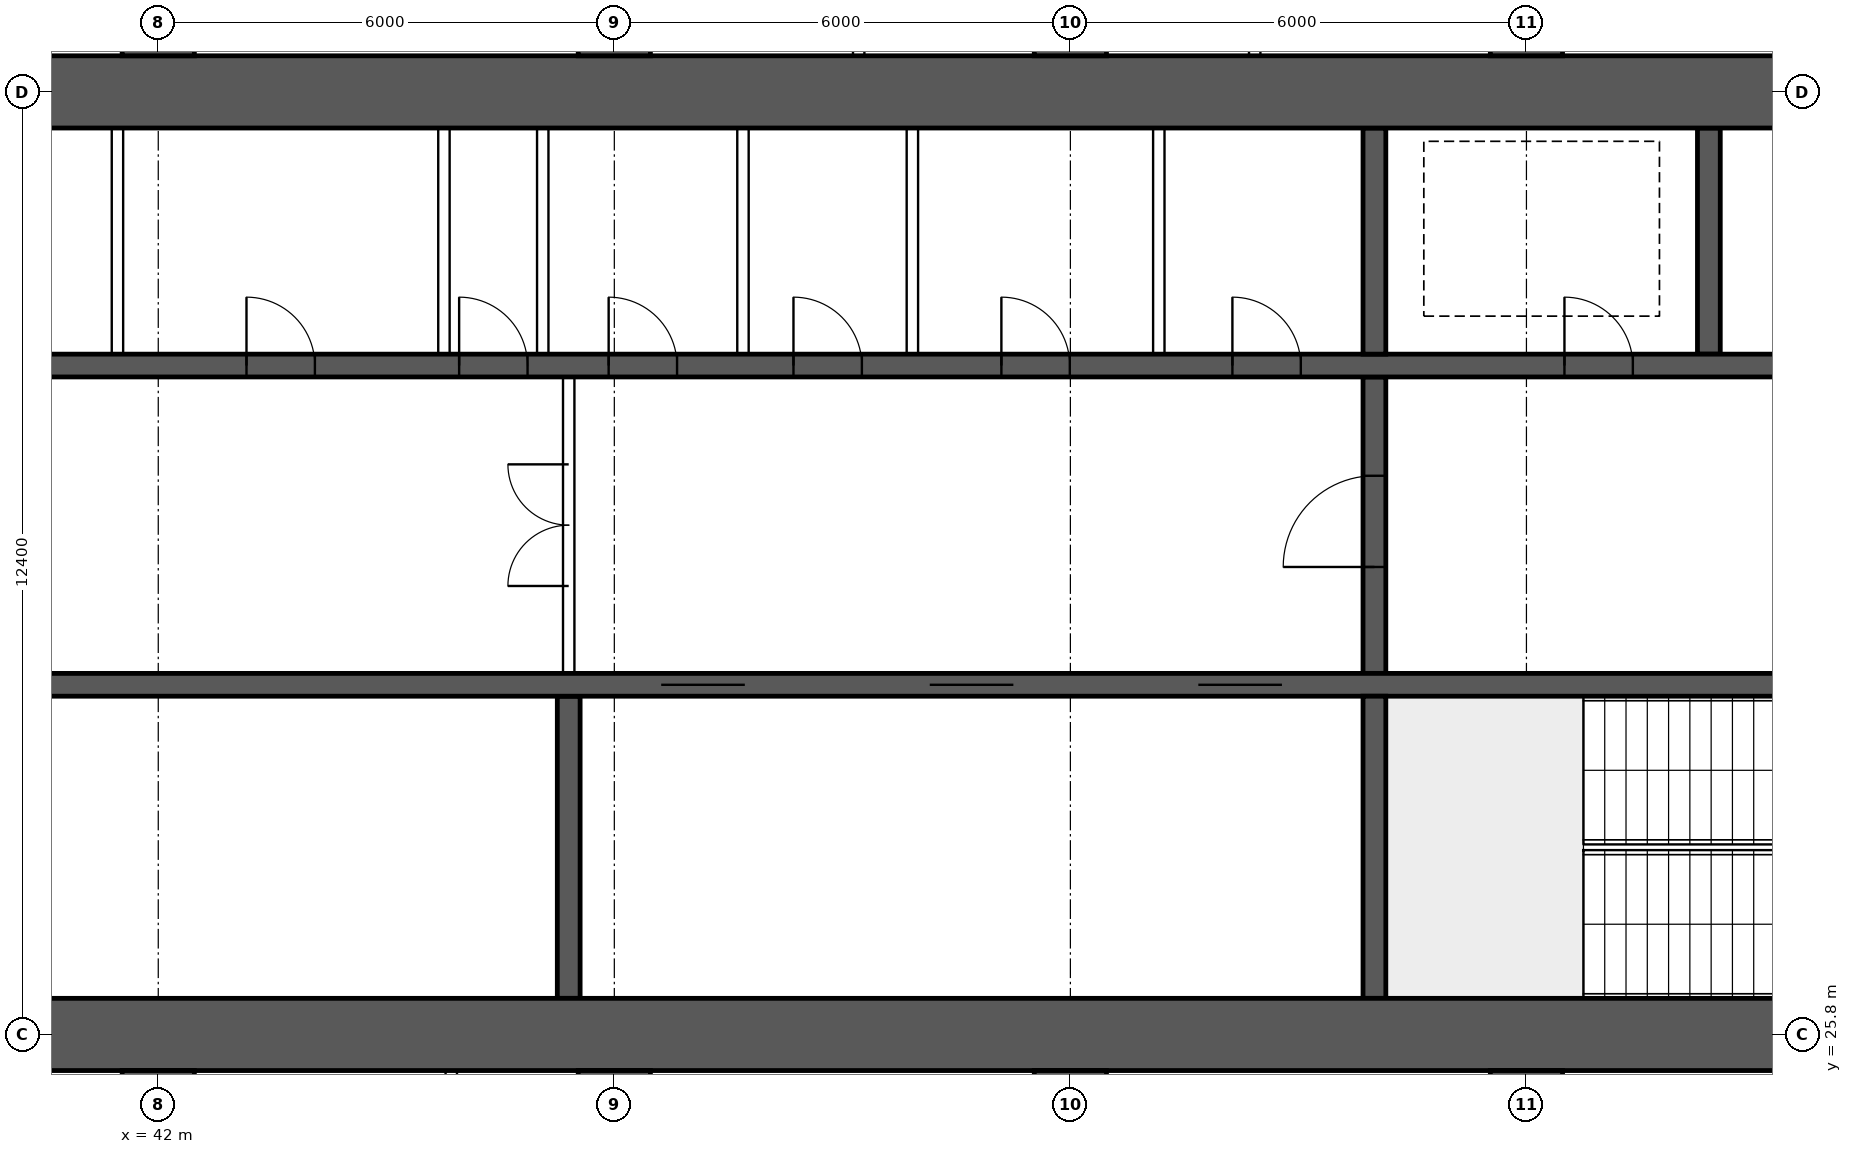
"""IFC4 building model, lengths in metres.
Left out: names, types, materials, properties, quantities, classifications, styles, units other than length and angle.
Written with IfcOpenShell. Run it as: python <this file> out.ifc"""

import sys

from ifc_helpers import new_model, si_unit, direction, frame, frame_2d, origin, place, context, subcontext, project, spatial, rectangle, extrude, element, fill, save


model = new_model("IFC4")
c1 = context("Model", 3, precision=1e-05, world=origin(), true_north=direction((0.0, 1.0)))
c2 = subcontext(c1, "Body", "Model", "MODEL_VIEW")
j1 = project(units=[si_unit("LENGTHUNIT", "METRE"), si_unit("PLANEANGLEUNIT", "RADIAN")], contexts=[c1])
p1 = place(None, origin())
s1 = spatial("IfcSite", under=j1, at=p1, CompositionType="ELEMENT")
p2 = place(p1, origin())
s2 = spatial("IfcBuilding", under=s1, at=p2, CompositionType="ELEMENT")
p3 = place(p2, frame((0.0, 0.0, 125.65)))
s3 = spatial("IfcBuildingStorey", under=s2, at=p3, CompositionType="ELEMENT", Elevation=125.65)
for number, where, z_axis, x_axis in (
    (1, (18.0, 25.8, 0.0), (0.0, 0.0, 1.0), (1.0, 0.0, 0.0)),
    (2, (18.0, 38.2, 0.0), (0.0, 0.0, 1.0), (1.0, 0.0, 0.0)),
):
    element("IfcWall", number, at=place(p3, frame(where, z_axis=z_axis, x_axis=x_axis)), inside=s3, PredefinedType="SHEAR", context=c2, shape_type="SweptSolid", body=[
        extrude(rectangle(XDim=48.0, YDim=0.95, at=frame_2d((24.0, 0.0))), origin(), (0.0, 0.0, 1.0), 3.75),
    ])
p4 = place(p3, frame((18.475, 30.4, 0.0), z_axis=(0.0, 0.0, 1.0), x_axis=(1.0, 0.0, 0.0)))
e3 = element("IfcWall", 3, at=p4, inside=s3, PredefinedType="SHEAR", context=c2, shape_type="SweptSolid", body=[
    extrude(rectangle(XDim=47.05, YDim=0.3, at=frame_2d((23.525, 0.0))), origin(), (0.0, 0.0, 1.0), 3.75),
])
p5 = place(p4, frame((0.4, 0.0, 0.0)))
e4 = element("IfcOpeningElement", 4, at=p5, cuts=e3, PredefinedType="OPENING", context=c2, shape_type="SweptSolid", body=[
    extrude(rectangle(XDim=1.0, YDim=2.1, at=frame_2d((0.5, 1.05))), frame((0.0, 0.16, 0.0), z_axis=(0.0, -1.0, 0.0), x_axis=(1.0, 0.0, 0.0)), (0.0, 0.0, 1.0), 0.32),
])
p6 = place(p4, frame((45.65, 0.0, 0.0)))
e5 = element("IfcOpeningElement", 5, at=p6, cuts=e3, PredefinedType="OPENING", context=c2, shape_type="SweptSolid", body=[
    extrude(rectangle(XDim=1.0, YDim=2.1, at=frame_2d((0.5, 1.05))), frame((0.0, 0.16, 0.0), z_axis=(0.0, -1.0, 0.0), x_axis=(1.0, 0.0, 0.0)), (0.0, 0.0, 1.0), 0.32),
])
p7 = place(p4, frame((8.275, 0.0, 0.0)))
e6 = element("IfcOpeningElement", 6, at=p7, cuts=e3, PredefinedType="OPENING", context=c2, shape_type="SweptSolid", body=[
    extrude(rectangle(XDim=1.1, YDim=2.1, at=frame_2d((0.55, 1.05))), frame((0.0, 0.16, 0.0), z_axis=(0.0, -1.0, 0.0), x_axis=(1.0, 0.0, 0.0)), (0.0, 0.0, 1.0), 0.32),
])
p8 = place(p4, frame((10.875, 0.0, 0.0)))
e7 = element("IfcOpeningElement", 7, at=p8, cuts=e3, PredefinedType="OPENING", context=c2, shape_type="SweptSolid", body=[
    extrude(rectangle(XDim=1.1, YDim=2.1, at=frame_2d((0.55, 1.05))), frame((0.0, 0.16, 0.0), z_axis=(0.0, -1.0, 0.0), x_axis=(1.0, 0.0, 0.0)), (0.0, 0.0, 1.0), 0.32),
])
p9 = place(p4, frame((13.475, 0.0, 0.0)))
e8 = element("IfcOpeningElement", 8, at=p9, cuts=e3, PredefinedType="OPENING", context=c2, shape_type="SweptSolid", body=[
    extrude(rectangle(XDim=1.1, YDim=2.1, at=frame_2d((0.55, 1.05))), frame((0.0, 0.16, 0.0), z_axis=(0.0, -1.0, 0.0), x_axis=(1.0, 0.0, 0.0)), (0.0, 0.0, 1.0), 0.32),
])
p10 = place(p4, frame((16.075, 0.0, 0.0)))
e9 = element("IfcOpeningElement", 9, at=p10, cuts=e3, PredefinedType="OPENING", context=c2, shape_type="SweptSolid", body=[
    extrude(rectangle(XDim=1.1, YDim=2.1, at=frame_2d((0.55, 1.05))), frame((0.0, 0.16, 0.0), z_axis=(0.0, -1.0, 0.0), x_axis=(1.0, 0.0, 0.0)), (0.0, 0.0, 1.0), 0.32),
])
p11 = place(p4, frame((18.85, 0.0, 0.0)))
e10 = element("IfcOpeningElement", 10, at=p11, cuts=e3, PredefinedType="OPENING", context=c2, shape_type="SweptSolid", body=[
    extrude(rectangle(XDim=0.9, YDim=2.1, at=frame_2d((0.45, 1.05))), frame((0.0, 0.16, 0.0), z_axis=(0.0, -1.0, 0.0), x_axis=(1.0, 0.0, 0.0)), (0.0, 0.0, 1.0), 0.32),
])
p12 = place(p4, frame((30.142, 0.0, 0.0)))
e11 = element("IfcOpeningElement", 11, at=p12, cuts=e3, PredefinedType="OPENING", context=c2, shape_type="SweptSolid", body=[
    extrude(rectangle(XDim=1.1, YDim=2.1, at=frame_2d((0.55, 1.05))), frame((0.0, 0.16, 0.0), z_axis=(0.0, -1.0, 0.0), x_axis=(1.0, 0.0, 0.0)), (0.0, 0.0, 1.0), 0.32),
])
p13 = place(p4, frame((33.675, 0.0, 0.0)))
e12 = element("IfcOpeningElement", 12, at=p13, cuts=e3, PredefinedType="OPENING", context=c2, shape_type="SweptSolid", body=[
    extrude(rectangle(XDim=1.1, YDim=2.1, at=frame_2d((0.55, 1.05))), frame((0.0, 0.16, 0.0), z_axis=(0.0, -1.0, 0.0), x_axis=(1.0, 0.0, 0.0)), (0.0, 0.0, 1.0), 0.32),
])
p14 = place(p4, frame((37.208, 0.0, 0.0)))
e13 = element("IfcOpeningElement", 13, at=p14, cuts=e3, PredefinedType="OPENING", context=c2, shape_type="SweptSolid", body=[
    extrude(rectangle(XDim=1.1, YDim=2.1, at=frame_2d((0.55, 1.05))), frame((0.0, 0.16, 0.0), z_axis=(0.0, -1.0, 0.0), x_axis=(1.0, 0.0, 0.0)), (0.0, 0.0, 1.0), 0.32),
])
p15 = place(p3, frame((18.475, 34.6, 0.0), z_axis=(0.0, 0.0, 1.0), x_axis=(1.0, 0.0, 0.0)))
e14 = element("IfcWall", 14, at=p15, inside=s3, PredefinedType="SHEAR", context=c2, shape_type="SweptSolid", body=[
    extrude(rectangle(XDim=47.05, YDim=0.3, at=frame_2d((23.525, 0.0))), origin(), (0.0, 0.0, 1.0), 3.75),
])
p16 = place(p15, frame((0.9, 0.0, 0.0)))
e15 = element("IfcOpeningElement", 15, at=p16, cuts=e14, PredefinedType="OPENING", context=c2, shape_type="SweptSolid", body=[
    extrude(rectangle(XDim=1.1, YDim=2.1, at=frame_2d((0.55, 1.05))), frame((0.0, 0.16, 0.0), z_axis=(0.0, -1.0, 0.0), x_axis=(1.0, 0.0, 0.0)), (0.0, 0.0, 1.0), 0.32),
])
p17 = place(p15, frame((45.05, 0.0, 0.0)))
e16 = element("IfcOpeningElement", 16, at=p17, cuts=e14, PredefinedType="OPENING", context=c2, shape_type="SweptSolid", body=[
    extrude(rectangle(XDim=1.1, YDim=2.1, at=frame_2d((0.55, 1.05))), frame((0.0, 0.16, 0.0), z_axis=(0.0, -1.0, 0.0), x_axis=(1.0, 0.0, 0.0)), (0.0, 0.0, 1.0), 0.32),
])
p18 = place(p15, frame((4.125, 0.0, 0.0)))
e17 = element("IfcOpeningElement", 17, at=p18, cuts=e14, PredefinedType="OPENING", context=c2, shape_type="SweptSolid", body=[
    extrude(rectangle(XDim=0.9, YDim=2.1, at=frame_2d((0.45, 1.05))), frame((0.0, 0.16, 0.0), z_axis=(0.0, -1.0, 0.0), x_axis=(1.0, 0.0, 0.0)), (0.0, 0.0, 1.0), 0.32),
])
p19 = place(p15, frame((42.025, 0.0, 0.0)))
e18 = element("IfcOpeningElement", 18, at=p19, cuts=e14, PredefinedType="OPENING", context=c2, shape_type="SweptSolid", body=[
    extrude(rectangle(XDim=0.9, YDim=2.1, at=frame_2d((0.45, 1.05))), frame((0.0, 0.16, 0.0), z_axis=(0.0, -1.0, 0.0), x_axis=(1.0, 0.0, 0.0)), (0.0, 0.0, 1.0), 0.32),
])
p20 = place(p15, frame((8.9, 0.0, 0.0)))
e19 = element("IfcOpeningElement", 19, at=p20, cuts=e14, PredefinedType="OPENING", context=c2, shape_type="SweptSolid", body=[
    extrude(rectangle(XDim=0.9, YDim=2.1, at=frame_2d((0.45, 1.05))), frame((0.0, 0.16, 0.0), z_axis=(0.0, -1.0, 0.0), x_axis=(1.0, 0.0, 0.0)), (0.0, 0.0, 1.0), 0.32),
])
p21 = place(p15, frame((12.874, 0.0, 0.0)))
e20 = element("IfcOpeningElement", 20, at=p21, cuts=e14, PredefinedType="OPENING", context=c2, shape_type="SweptSolid", body=[
    extrude(rectangle(XDim=0.9, YDim=2.1, at=frame_2d((0.45, 1.05))), frame((0.0, 0.16, 0.0), z_axis=(0.0, -1.0, 0.0), x_axis=(1.0, 0.0, 0.0)), (0.0, 0.0, 1.0), 0.32),
])
p22 = place(p15, frame((16.521, 0.0, 0.0)))
e21 = element("IfcOpeningElement", 21, at=p22, cuts=e14, PredefinedType="OPENING", context=c2, shape_type="SweptSolid", body=[
    extrude(rectangle(XDim=0.9, YDim=2.1, at=frame_2d((0.45, 1.05))), frame((0.0, 0.16, 0.0), z_axis=(0.0, -1.0, 0.0), x_axis=(1.0, 0.0, 0.0)), (0.0, 0.0, 1.0), 0.32),
])
p23 = place(p15, frame((20.28, 0.0, 0.0)))
e22 = element("IfcOpeningElement", 22, at=p23, cuts=e14, PredefinedType="OPENING", context=c2, shape_type="SweptSolid", body=[
    extrude(rectangle(XDim=0.9, YDim=2.1, at=frame_2d((0.45, 1.05))), frame((0.0, 0.16, 0.0), z_axis=(0.0, -1.0, 0.0), x_axis=(1.0, 0.0, 0.0)), (0.0, 0.0, 1.0), 0.32),
])
p24 = place(p15, frame((24.686, 0.0, 0.0)))
e23 = element("IfcOpeningElement", 23, at=p24, cuts=e14, PredefinedType="OPENING", context=c2, shape_type="SweptSolid", body=[
    extrude(rectangle(XDim=0.9, YDim=2.1, at=frame_2d((0.45, 1.05))), frame((0.0, 0.16, 0.0), z_axis=(0.0, -1.0, 0.0), x_axis=(1.0, 0.0, 0.0)), (0.0, 0.0, 1.0), 0.32),
])
p25 = place(p15, frame((27.483, 0.0, 0.0)))
e24 = element("IfcOpeningElement", 24, at=p25, cuts=e14, PredefinedType="OPENING", context=c2, shape_type="SweptSolid", body=[
    extrude(rectangle(XDim=0.9, YDim=2.1, at=frame_2d((0.45, 1.05))), frame((0.0, 0.16, 0.0), z_axis=(0.0, -1.0, 0.0), x_axis=(1.0, 0.0, 0.0)), (0.0, 0.0, 1.0), 0.32),
])
p26 = place(p15, frame((29.45, 0.0, 0.0)))
e25 = element("IfcOpeningElement", 25, at=p26, cuts=e14, PredefinedType="OPENING", context=c2, shape_type="SweptSolid", body=[
    extrude(rectangle(XDim=0.9, YDim=2.1, at=frame_2d((0.45, 1.05))), frame((0.0, 0.16, 0.0), z_axis=(0.0, -1.0, 0.0), x_axis=(1.0, 0.0, 0.0)), (0.0, 0.0, 1.0), 0.32),
])
p27 = place(p15, frame((31.882, 0.0, 0.0)))
e26 = element("IfcOpeningElement", 26, at=p27, cuts=e14, PredefinedType="OPENING", context=c2, shape_type="SweptSolid", body=[
    extrude(rectangle(XDim=0.9, YDim=2.1, at=frame_2d((0.45, 1.05))), frame((0.0, 0.16, 0.0), z_axis=(0.0, -1.0, 0.0), x_axis=(1.0, 0.0, 0.0)), (0.0, 0.0, 1.0), 0.32),
])
p28 = place(p15, frame((34.617, 0.0, 0.0)))
e27 = element("IfcOpeningElement", 27, at=p28, cuts=e14, PredefinedType="OPENING", context=c2, shape_type="SweptSolid", body=[
    extrude(rectangle(XDim=0.9, YDim=2.1, at=frame_2d((0.45, 1.05))), frame((0.0, 0.16, 0.0), z_axis=(0.0, -1.0, 0.0), x_axis=(1.0, 0.0, 0.0)), (0.0, 0.0, 1.0), 0.32),
])
p29 = place(p15, frame((37.656, 0.0, 0.0)))
e28 = element("IfcOpeningElement", 28, at=p29, cuts=e14, PredefinedType="OPENING", context=c2, shape_type="SweptSolid", body=[
    extrude(rectangle(XDim=0.9, YDim=2.1, at=frame_2d((0.45, 1.05))), frame((0.0, 0.16, 0.0), z_axis=(0.0, -1.0, 0.0), x_axis=(1.0, 0.0, 0.0)), (0.0, 0.0, 1.0), 0.32),
])
p30 = place(p3, frame((58.0, 26.275, 0.0), z_axis=(0.0, 0.0, 1.0), x_axis=(0.0, 1.0, 0.0)))
e29 = element("IfcWall", 29, at=p30, inside=s3, PredefinedType="SHEAR", context=c2, shape_type="SweptSolid", body=[
    extrude(rectangle(XDim=3.975, YDim=0.3, at=frame_2d((1.988, 0.0))), origin(), (0.0, 0.0, 1.0), 3.75),
])
p31 = place(p3, frame((58.0, 30.55, 0.0), z_axis=(0.0, 0.0, 1.0), x_axis=(0.0, 1.0, 0.0)))
e30 = element("IfcWall", 30, at=p31, inside=s3, PredefinedType="SHEAR", context=c2, shape_type="SweptSolid", body=[
    extrude(rectangle(XDim=3.9, YDim=0.3, at=frame_2d((1.95, 0.0))), origin(), (0.0, 0.0, 1.0), 3.75),
])
p32 = place(p31, frame((1.4, 0.0, 0.0)))
e31 = element("IfcOpeningElement", 31, at=p32, cuts=e30, PredefinedType="OPENING", context=c2, shape_type="SweptSolid", body=[
    extrude(rectangle(XDim=1.2, YDim=2.1, at=frame_2d((0.6, 1.05))), frame((0.0, 0.16, 0.0), z_axis=(0.0, -1.0, 0.0), x_axis=(1.0, 0.0, 0.0)), (0.0, 0.0, 1.0), 0.32),
])
for number, where, z_axis, x_axis in (
    (32, (62.4, 34.75, 0.0), (0.0, 0.0, 1.0), (0.0, 1.0, 0.0)),
    (33, (58.0, 34.75, 0.0), (0.0, 0.0, 1.0), (0.0, 1.0, 0.0)),
):
    element("IfcWall", number, at=place(p3, frame(where, z_axis=z_axis, x_axis=x_axis)), inside=s3, PredefinedType="SHEAR", context=c2, shape_type="SweptSolid", body=[
        extrude(rectangle(XDim=2.975, YDim=0.3, at=frame_2d((1.488, 0.0))), origin(), (0.0, 0.0, 1.0), 3.75),
    ])
p33 = place(p3, frame((47.4, 26.275, 0.0), z_axis=(0.0, 0.0, 1.0), x_axis=(0.0, 1.0, 0.0)))
e34 = element("IfcWall", 34, at=p33, inside=s3, PredefinedType="SHEAR", context=c2, shape_type="SweptSolid", body=[
    extrude(rectangle(XDim=3.975, YDim=0.3, at=frame_2d((1.988, 0.0))), origin(), (0.0, 0.0, 1.0), 3.75),
])
for number, where, z_axis, x_axis in (
    (35, (42.0, 16.0, 0.0), (0.0, 0.0, 1.0), (0.0, 1.0, 0.0)),
    (36, (42.0, 38.675, 0.0), (0.0, 0.0, 1.0), (0.0, 1.0, 0.0)),
    (37, (48.0, 16.0, 0.0), (0.0, 0.0, 1.0), (0.0, 1.0, 0.0)),
    (38, (48.0, 38.675, 0.0), (0.0, 0.0, 1.0), (0.0, 1.0, 0.0)),
    (39, (54.0, 16.0, 0.0), (0.0, 0.0, 1.0), (0.0, 1.0, 0.0)),
    (40, (54.0, 38.675, 0.0), (0.0, 0.0, 1.0), (0.0, 1.0, 0.0)),
    (41, (60.0, 16.0, 0.0), (0.0, 0.0, 1.0), (0.0, 1.0, 0.0)),
    (42, (60.0, 38.675, 0.0), (0.0, 0.0, 1.0), (0.0, 1.0, 0.0)),
):
    element("IfcWall", number, at=place(p3, frame(where, z_axis=z_axis, x_axis=x_axis)), inside=s3, PredefinedType="SHEAR", context=c2, shape_type="SweptSolid", body=[
        extrude(rectangle(XDim=9.325, YDim=0.95, at=frame_2d((4.663, 0.0))), origin(), (0.0, 0.0, 1.0), 3.75),
    ])
p34 = place(p3, frame((47.4, 30.55, 0.0), z_axis=(0.0, 0.0, 1.0), x_axis=(0.0, 1.0, 0.0)))
e43 = element("IfcWall", 43, at=p34, inside=s3, PredefinedType="SOLIDWALL", context=c2, shape_type="SweptSolid", body=[
    extrude(rectangle(XDim=3.9, YDim=0.15, at=frame_2d((1.95, 0.0))), origin(), (0.0, 0.0, 1.0), 3.5),
])
p35 = place(p34, frame((1.15, 0.0, 0.0)))
e44 = element("IfcOpeningElement", 44, at=p35, cuts=e43, PredefinedType="OPENING", context=c2, shape_type="SweptSolid", body=[
    extrude(rectangle(XDim=1.6, YDim=2.1, at=frame_2d((0.8, 1.05))), frame((0.0, 0.085, 0.0), z_axis=(0.0, -1.0, 0.0), x_axis=(1.0, 0.0, 0.0)), (0.0, 0.0, 1.0), 0.17),
])
for number, where, z_axis, x_axis in (
    (45, (41.463, 34.75, 0.0), (0.0, 0.0, 1.0), (0.0, 1.0, 0.0)),
    (46, (45.758, 34.75, 0.0), (0.0, 0.0, 1.0), (0.0, 1.0, 0.0)),
    (47, (47.058, 34.75, 0.0), (0.0, 0.0, 1.0), (0.0, 1.0, 0.0)),
    (48, (49.692, 34.75, 0.0), (0.0, 0.0, 1.0), (0.0, 1.0, 0.0)),
    (49, (51.921, 34.75, 0.0), (0.0, 0.0, 1.0), (0.0, 1.0, 0.0)),
    (50, (55.163, 34.75, 0.0), (0.0, 0.0, 1.0), (0.0, 1.0, 0.0)),
):
    element("IfcWall", number, at=place(p3, frame(where, z_axis=z_axis, x_axis=x_axis)), inside=s3, PredefinedType="SOLIDWALL", context=c2, shape_type="SweptSolid", body=[
        extrude(rectangle(XDim=2.975, YDim=0.15, at=frame_2d((1.488, 0.0))), origin(), (0.0, 0.0, 1.0), 3.5),
    ])
for number, where, z_axis, x_axis in (
    (51, (45.855, 16.1, 0.0), (0.0, 0.0, 1.0), (0.0, 1.0, 0.0)),
    (52, (51.215, 38.675, 0.0), (0.0, 0.0, 1.0), (0.0, 1.0, 0.0)),
    (53, (56.425, 38.675, 0.0), (0.0, 0.0, 1.0), (0.0, 1.0, 0.0)),
):
    element("IfcWall", number, at=place(p3, frame(where, z_axis=z_axis, x_axis=x_axis)), inside=s3, PredefinedType="PARTITIONING", context=c2, shape_type="SweptSolid", body=[
        extrude(rectangle(XDim=9.225, YDim=0.15, at=frame_2d((4.612, 0.0))), origin(), (0.0, 0.0, 1.0), 3.5),
    ])
p36 = place(p35, origin())
e54 = element("IfcDoor", 54, at=p36, inside=s3, OperationType="DOUBLE_DOOR_SINGLE_SWING", PredefinedType="DOOR", context=c2, shape_type="SweptSolid", body=[
    extrude(rectangle(XDim=1.6, YDim=2.1, at=frame_2d((0.8, 1.05))), frame((0.0, 0.025, 0.0), z_axis=(0.0, -1.0, 0.0), x_axis=(1.0, 0.0, 0.0)), (0.0, 0.0, 1.0), 0.05),
])
fill(e44, e54)
p37 = place(p19, origin())
e55 = element("IfcDoor", 55, at=p37, inside=s3, OperationType="SINGLE_SWING_LEFT", PredefinedType="DOOR", context=c2, shape_type="SweptSolid", body=[
    extrude(rectangle(XDim=0.9, YDim=2.1, at=frame_2d((0.45, 1.05))), frame((0.0, 0.025, 0.0), z_axis=(0.0, -1.0, 0.0), x_axis=(1.0, 0.0, 0.0)), (0.0, 0.0, 1.0), 0.05),
])
fill(e18, e55)
p38 = place(p32, origin())
e56 = element("IfcDoor", 56, at=p38, inside=s3, OperationType="SINGLE_SWING_LEFT", PredefinedType="DOOR", context=c2, shape_type="SweptSolid", body=[
    extrude(rectangle(XDim=1.2, YDim=2.1, at=frame_2d((0.6, 1.05))), frame((0.0, 0.025, 0.0), z_axis=(0.0, -1.0, 0.0), x_axis=(1.0, 0.0, 0.0)), (0.0, 0.0, 1.0), 0.05),
])
fill(e31, e56)
p39 = place(p24, origin())
e57 = element("IfcDoor", 57, at=p39, inside=s3, OperationType="SINGLE_SWING_LEFT", PredefinedType="DOOR", context=c2, shape_type="SweptSolid", body=[
    extrude(rectangle(XDim=0.9, YDim=2.1, at=frame_2d((0.45, 1.05))), frame((0.0, 0.025, 0.0), z_axis=(0.0, -1.0, 0.0), x_axis=(1.0, 0.0, 0.0)), (0.0, 0.0, 1.0), 0.05),
])
fill(e23, e57)
p40 = place(p25, origin())
e58 = element("IfcDoor", 58, at=p40, inside=s3, OperationType="SINGLE_SWING_LEFT", PredefinedType="DOOR", context=c2, shape_type="SweptSolid", body=[
    extrude(rectangle(XDim=0.9, YDim=2.1, at=frame_2d((0.45, 1.05))), frame((0.0, 0.025, 0.0), z_axis=(0.0, -1.0, 0.0), x_axis=(1.0, 0.0, 0.0)), (0.0, 0.0, 1.0), 0.05),
])
fill(e24, e58)
p41 = place(p26, origin())
e59 = element("IfcDoor", 59, at=p41, inside=s3, OperationType="SINGLE_SWING_LEFT", PredefinedType="DOOR", context=c2, shape_type="SweptSolid", body=[
    extrude(rectangle(XDim=0.9, YDim=2.1, at=frame_2d((0.45, 1.05))), frame((0.0, 0.025, 0.0), z_axis=(0.0, -1.0, 0.0), x_axis=(1.0, 0.0, 0.0)), (0.0, 0.0, 1.0), 0.05),
])
fill(e25, e59)
p42 = place(p27, origin())
e60 = element("IfcDoor", 60, at=p42, inside=s3, OperationType="SINGLE_SWING_LEFT", PredefinedType="DOOR", context=c2, shape_type="SweptSolid", body=[
    extrude(rectangle(XDim=0.9, YDim=2.1, at=frame_2d((0.45, 1.05))), frame((0.0, 0.025, 0.0), z_axis=(0.0, -1.0, 0.0), x_axis=(1.0, 0.0, 0.0)), (0.0, 0.0, 1.0), 0.05),
])
fill(e26, e60)
p43 = place(p28, origin())
e61 = element("IfcDoor", 61, at=p43, inside=s3, OperationType="SINGLE_SWING_LEFT", PredefinedType="DOOR", context=c2, shape_type="SweptSolid", body=[
    extrude(rectangle(XDim=0.9, YDim=2.1, at=frame_2d((0.45, 1.05))), frame((0.0, 0.025, 0.0), z_axis=(0.0, -1.0, 0.0), x_axis=(1.0, 0.0, 0.0)), (0.0, 0.0, 1.0), 0.05),
])
fill(e27, e61)
p44 = place(p29, origin())
e62 = element("IfcDoor", 62, at=p44, inside=s3, OperationType="SINGLE_SWING_LEFT", PredefinedType="DOOR", context=c2, shape_type="SweptSolid", body=[
    extrude(rectangle(XDim=0.9, YDim=2.1, at=frame_2d((0.45, 1.05))), frame((0.0, 0.025, 0.0), z_axis=(0.0, -1.0, 0.0), x_axis=(1.0, 0.0, 0.0)), (0.0, 0.0, 1.0), 0.05),
])
fill(e28, e62)
p45 = place(p12, origin())
e63 = element("IfcDoor", 63, at=p45, inside=s3, OperationType="DOUBLE_DOOR_SLIDING", PredefinedType="DOOR", context=c2, shape_type="SweptSolid", body=[
    extrude(rectangle(XDim=1.1, YDim=2.1, at=frame_2d((0.55, 1.05))), frame((0.0, 0.025, 0.0), z_axis=(0.0, -1.0, 0.0), x_axis=(1.0, 0.0, 0.0)), (0.0, 0.0, 1.0), 0.05),
])
fill(e11, e63)
p46 = place(p13, origin())
e64 = element("IfcDoor", 64, at=p46, inside=s3, OperationType="DOUBLE_DOOR_SLIDING", PredefinedType="DOOR", context=c2, shape_type="SweptSolid", body=[
    extrude(rectangle(XDim=1.1, YDim=2.1, at=frame_2d((0.55, 1.05))), frame((0.0, 0.025, 0.0), z_axis=(0.0, -1.0, 0.0), x_axis=(1.0, 0.0, 0.0)), (0.0, 0.0, 1.0), 0.05),
])
fill(e12, e64)
p47 = place(p14, origin())
e65 = element("IfcDoor", 65, at=p47, inside=s3, OperationType="DOUBLE_DOOR_SLIDING", PredefinedType="DOOR", context=c2, shape_type="SweptSolid", body=[
    extrude(rectangle(XDim=1.1, YDim=2.1, at=frame_2d((0.55, 1.05))), frame((0.0, 0.025, 0.0), z_axis=(0.0, -1.0, 0.0), x_axis=(1.0, 0.0, 0.0)), (0.0, 0.0, 1.0), 0.05),
])
fill(e13, e65)
save(model, sys.argv[1])
